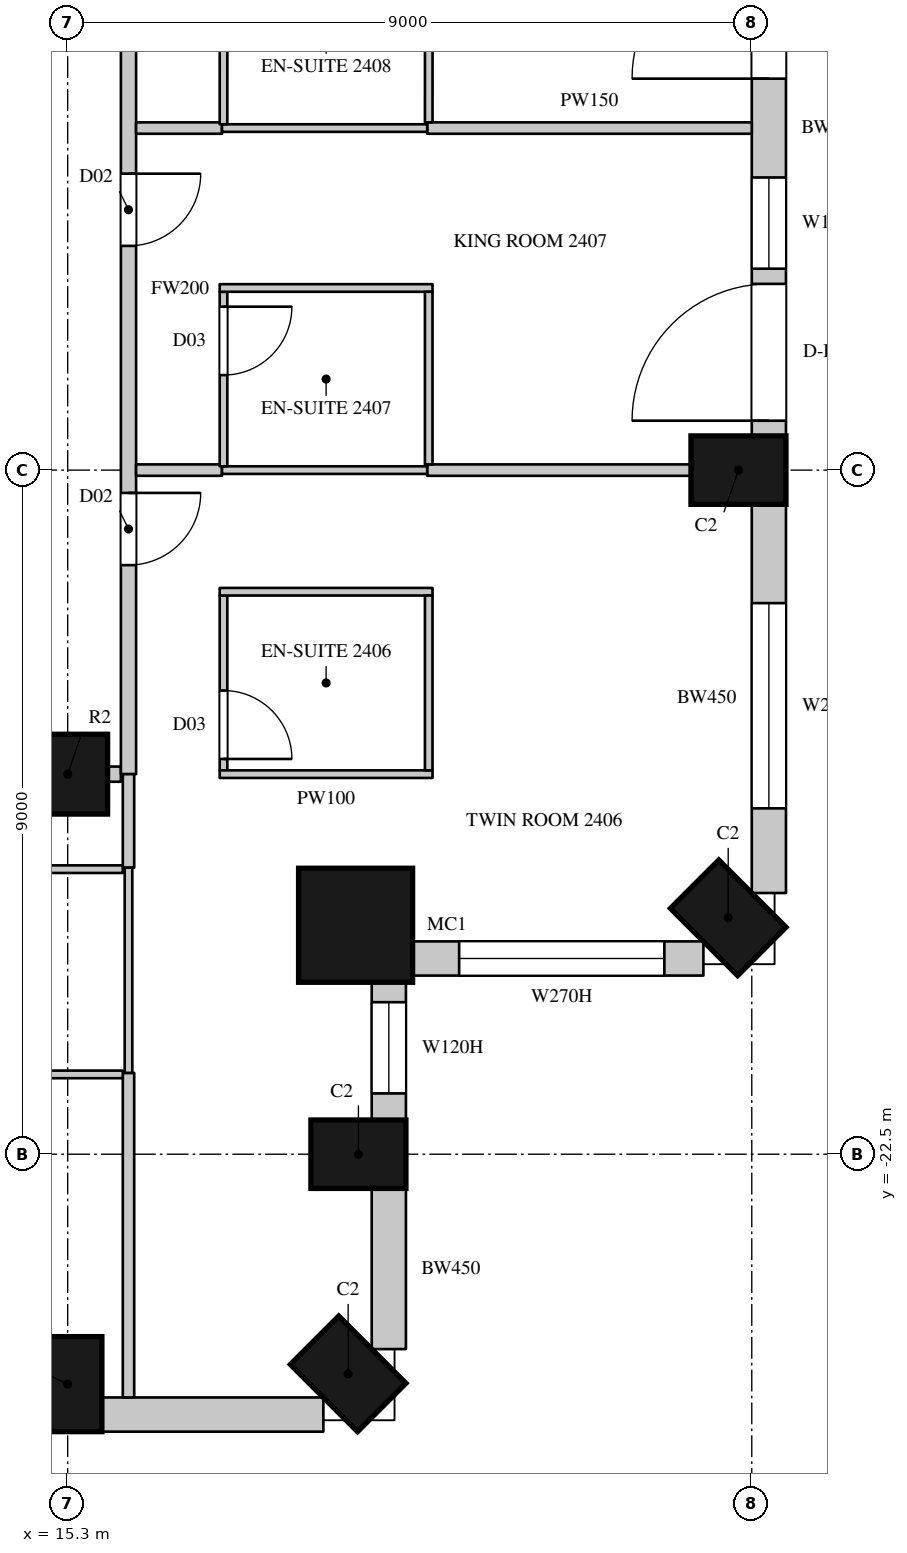
"""IFC4 building model, lengths in metres.
Left out: names, types, materials, properties, quantities, classifications, styles, units other than length and angle.
Written with IfcOpenShell. Run it as: python <this file> out.ifc"""

import sys

from ifc_helpers import new_model, si_unit, direction, frame, frame_2d, origin, origin_2d, place, context, subcontext, project, spatial, rectangle, circle, extrude, element, fill, save


model = new_model("IFC4")
c1 = context("Model", 3, precision=1e-05, world=origin(), true_north=direction((0.0, 1.0)))
c2 = subcontext(c1, "Body", "Model", "MODEL_VIEW")
j1 = project(units=[si_unit("LENGTHUNIT", "METRE"), si_unit("PLANEANGLEUNIT", "RADIAN")], contexts=[c1])
p1 = place(None, origin())
s1 = spatial("IfcSite", under=j1, at=p1, CompositionType="ELEMENT")
p2 = place(p1, origin())
s2 = spatial("IfcBuilding", under=s1, at=p2, CompositionType="ELEMENT")
p3 = place(p2, frame((0.0, 0.0, 116.7)))
s3 = spatial("IfcBuildingStorey", under=s2, at=p3, CompositionType="ELEMENT", Elevation=116.7)
for number, where, z_axis, x_axis in (
    (1, (15.3, -25.525, 0.0), (0.0, 0.0, 1.0), (1.0, 0.0, 0.0)),
    (2, (18.99, -25.39, 0.0), (0.0, 0.0, 1.0), (0.707, 0.707, 0.0)),
    (3, (19.125, -22.5, 0.0), (0.0, 0.0, 1.0), (0.0, 1.0, 0.0)),
):
    element("IfcColumn", number, at=place(p3, frame(where, z_axis=z_axis, x_axis=x_axis)), inside=s3, PredefinedType="COLUMN", context=c2, shape_type="SweptSolid", body=[
        extrude(rectangle(XDim=0.9, YDim=1.25, at=origin_2d()), origin(), (0.0, 0.0, 1.0), 3.6),
    ])
p4 = place(p3, frame((19.088, -19.488, 0.0), z_axis=(0.0, 0.0, 1.0), x_axis=(1.0, 0.0, 0.0)))
e4 = element("IfcColumn", 4, at=p4, inside=s3, PredefinedType="COLUMN", context=c2, shape_type="SweptSolid", body=[
    extrude(circle(Radius=0.75, at=origin_2d()), origin(), (0.0, 0.0, 1.0), 3.6),
])
for number, where, z_axis, x_axis in (
    (5, (23.99, -19.39, 0.0), (0.0, 0.0, 1.0), (0.707, 0.707, 0.0)),
    (6, (24.125, -13.5, 0.0), (0.0, 0.0, 1.0), (0.0, 1.0, 0.0)),
):
    element("IfcColumn", number, at=place(p3, frame(where, z_axis=z_axis, x_axis=x_axis)), inside=s3, PredefinedType="COLUMN", context=c2, shape_type="SweptSolid", body=[
        extrude(rectangle(XDim=0.9, YDim=1.25, at=origin_2d()), origin(), (0.0, 0.0, 1.0), 3.6),
    ])
p5 = place(p3, frame((15.3, -17.5, 0.0), z_axis=(0.0, 0.0, 1.0), x_axis=(1.0, 0.0, 0.0)))
e7 = element("IfcColumn", 7, at=p5, inside=s3, PredefinedType="COLUMN", context=c2, shape_type="SweptSolid", body=[
    extrude(circle(Radius=0.525, at=origin_2d()), origin(), (0.0, 0.0, 1.0), 3.6),
])
p6 = place(p3, frame((15.75, -25.925, 0.0), z_axis=(0.0, 0.0, 1.0), x_axis=(1.0, 0.0, 0.0)))
e8 = element("IfcWall", 8, at=p6, inside=s3, PredefinedType="SOLIDWALL", context=c2, shape_type="SweptSolid", body=[
    extrude(rectangle(XDim=2.914, YDim=0.45, at=frame_2d((1.457, 0.0))), origin(), (0.0, 0.0, 1.0), 3.3),
])
p7 = place(p3, frame((19.525, -25.064, 0.0), z_axis=(0.0, 0.0, 1.0), x_axis=(0.0, 1.0, 0.0)))
e9 = element("IfcWall", 9, at=p7, inside=s3, PredefinedType="SOLIDWALL", context=c2, shape_type="SweptSolid", body=[
    extrude(rectangle(XDim=2.114, YDim=0.45, at=frame_2d((1.057, 0.0))), origin(), (0.0, 0.0, 1.0), 3.3),
])
p8 = place(p3, frame((19.525, -22.05, 0.0), z_axis=(0.0, 0.0, 1.0), x_axis=(0.0, 1.0, 0.0)))
e10 = element("IfcWall", 10, at=p8, inside=s3, PredefinedType="SOLIDWALL", context=c2, shape_type="SweptSolid", body=[
    extrude(rectangle(XDim=1.843, YDim=0.45, at=frame_2d((0.921, 0.0))), origin(), (0.0, 0.0, 1.0), 3.3),
])
p9 = place(p8, frame((0.35, 0.0, 1.05)))
e11 = element("IfcOpeningElement", 11, at=p9, cuts=e10, PredefinedType="OPENING", context=c2, shape_type="SweptSolid", body=[
    extrude(rectangle(XDim=1.2, YDim=2.0, at=frame_2d((0.6, 1.0))), frame((0.0, 0.235, 0.0), z_axis=(0.0, -1.0, 0.0), x_axis=(1.0, 0.0, 0.0)), (0.0, 0.0, 1.0), 0.47),
])
p10 = place(p3, frame((19.807, -19.925, 0.0), z_axis=(0.0, 0.0, 1.0), x_axis=(1.0, 0.0, 0.0)))
e12 = element("IfcWall", 12, at=p10, inside=s3, PredefinedType="SOLIDWALL", context=c2, shape_type="SweptSolid", body=[
    extrude(rectangle(XDim=3.857, YDim=0.45, at=frame_2d((1.928, 0.0))), origin(), (0.0, 0.0, 1.0), 3.3),
])
p11 = place(p10, frame((0.643, 0.0, 1.05)))
e13 = element("IfcOpeningElement", 13, at=p11, cuts=e12, PredefinedType="OPENING", context=c2, shape_type="SweptSolid", body=[
    extrude(rectangle(XDim=2.7, YDim=2.0, at=frame_2d((1.35, 1.0))), frame((0.0, 0.235, 0.0), z_axis=(0.0, -1.0, 0.0), x_axis=(1.0, 0.0, 0.0)), (0.0, 0.0, 1.0), 0.47),
])
p12 = place(p3, frame((24.525, -19.064, 0.0), z_axis=(0.0, 0.0, 1.0), x_axis=(0.0, 1.0, 0.0)))
e14 = element("IfcWall", 14, at=p12, inside=s3, PredefinedType="SOLIDWALL", context=c2, shape_type="SweptSolid", body=[
    extrude(rectangle(XDim=5.114, YDim=0.45, at=frame_2d((2.557, 0.0))), origin(), (0.0, 0.0, 1.0), 3.3),
])
p13 = place(p12, frame((1.114, 0.0, 1.05)))
e15 = element("IfcOpeningElement", 15, at=p13, cuts=e14, PredefinedType="OPENING", context=c2, shape_type="SweptSolid", body=[
    extrude(rectangle(XDim=2.7, YDim=2.0, at=frame_2d((1.35, 1.0))), frame((0.0, 0.235, 0.0), z_axis=(0.0, -1.0, 0.0), x_axis=(1.0, 0.0, 0.0)), (0.0, 0.0, 1.0), 0.47),
])
p14 = place(p3, frame((24.525, -13.05, 0.0), z_axis=(0.0, 0.0, 1.0), x_axis=(0.0, 1.0, 0.0)))
e16 = element("IfcWall", 16, at=p14, inside=s3, PredefinedType="SOLIDWALL", context=c2, shape_type="SweptSolid", body=[
    extrude(rectangle(XDim=8.1, YDim=0.45, at=frame_2d((4.05, 0.0))), origin(), (0.0, 0.0, 1.0), 3.3),
])
p15 = place(p14, frame((0.2, 0.0, 0.0)))
e17 = element("IfcOpeningElement", 17, at=p15, cuts=e16, PredefinedType="OPENING", context=c2, shape_type="SweptSolid", body=[
    extrude(rectangle(XDim=1.8, YDim=2.4, at=frame_2d((0.9, 1.2))), frame((0.0, 0.235, 0.0), z_axis=(0.0, -1.0, 0.0), x_axis=(1.0, 0.0, 0.0)), (0.0, 0.0, 1.0), 0.47),
])
p16 = place(p14, frame((2.2, 0.0, 1.05)))
e18 = element("IfcOpeningElement", 18, at=p16, cuts=e16, PredefinedType="OPENING", context=c2, shape_type="SweptSolid", body=[
    extrude(rectangle(XDim=1.2, YDim=2.0, at=frame_2d((0.6, 1.0))), frame((0.0, 0.235, 0.0), z_axis=(0.0, -1.0, 0.0), x_axis=(1.0, 0.0, 0.0)), (0.0, 0.0, 1.0), 0.47),
])
p17 = place(p14, frame((4.7, 0.0, 0.0)))
e19 = element("IfcOpeningElement", 19, at=p17, cuts=e16, PredefinedType="OPENING", context=c2, shape_type="SweptSolid", body=[
    extrude(rectangle(XDim=1.8, YDim=2.4, at=frame_2d((0.9, 1.2))), frame((0.0, 0.235, 0.0), z_axis=(0.0, -1.0, 0.0), x_axis=(1.0, 0.0, 0.0)), (0.0, 0.0, 1.0), 0.47),
])
p18 = place(p14, frame((6.7, 0.0, 1.05)))
e20 = element("IfcOpeningElement", 20, at=p18, cuts=e16, PredefinedType="OPENING", context=c2, shape_type="SweptSolid", body=[
    extrude(rectangle(XDim=1.2, YDim=2.0, at=frame_2d((0.6, 1.0))), frame((0.0, 0.235, 0.0), z_axis=(0.0, -1.0, 0.0), x_axis=(1.0, 0.0, 0.0)), (0.0, 0.0, 1.0), 0.47),
])
p19 = place(p3, frame((15.825, -17.5, 0.0), z_axis=(0.0, 0.0, 1.0), x_axis=(1.0, 0.0, 0.0)))
e21 = element("IfcWall", 21, at=p19, inside=s3, PredefinedType="PARTITIONING", context=c2, shape_type="SweptSolid", body=[
    extrude(rectangle(XDim=0.175, YDim=0.2, at=frame_2d((0.087, 0.0))), origin(), (0.0, 0.0, 1.0), 3.3),
])
p20 = place(p3, frame((16.1, -17.5, 0.0), z_axis=(0.0, 0.0, 1.0), x_axis=(0.0, 1.0, 0.0)))
e22 = element("IfcWall", 22, at=p20, inside=s3, PredefinedType="PARTITIONING", context=c2, shape_type="SweptSolid", body=[
    extrude(rectangle(XDim=12.75, YDim=0.2, at=frame_2d((6.375, 0.0))), origin(), (0.0, 0.0, 1.0), 3.3),
])
p21 = place(p20, frame((2.75, 0.0, 0.0)))
e23 = element("IfcOpeningElement", 23, at=p21, cuts=e22, PredefinedType="OPENING", context=c2, shape_type="SweptSolid", body=[
    extrude(rectangle(XDim=0.95, YDim=2.2, at=frame_2d((0.475, 1.1))), frame((0.0, 0.11, 0.0), z_axis=(0.0, -1.0, 0.0), x_axis=(1.0, 0.0, 0.0)), (0.0, 0.0, 1.0), 0.22),
])
p22 = place(p20, frame((6.95, 0.0, 0.0)))
e24 = element("IfcOpeningElement", 24, at=p22, cuts=e22, PredefinedType="OPENING", context=c2, shape_type="SweptSolid", body=[
    extrude(rectangle(XDim=0.95, YDim=2.2, at=frame_2d((0.475, 1.1))), frame((0.0, 0.11, 0.0), z_axis=(0.0, -1.0, 0.0), x_axis=(1.0, 0.0, 0.0)), (0.0, 0.0, 1.0), 0.22),
])
p23 = place(p20, frame((11.4, 0.0, 0.0)))
e25 = element("IfcOpeningElement", 25, at=p23, cuts=e22, PredefinedType="OPENING", context=c2, shape_type="SweptSolid", body=[
    extrude(rectangle(XDim=0.95, YDim=2.2, at=frame_2d((0.475, 1.1))), frame((0.0, 0.11, 0.0), z_axis=(0.0, -1.0, 0.0), x_axis=(1.0, 0.0, 0.0)), (0.0, 0.0, 1.0), 0.22),
])
p24 = place(p3, frame((16.1, -25.7, 0.0), z_axis=(0.0, 0.0, 1.0), x_axis=(0.0, 1.0, 0.0)))
e26 = element("IfcWall", 26, at=p24, inside=s3, PredefinedType="PARTITIONING", context=c2, shape_type="SweptSolid", body=[
    extrude(rectangle(XDim=4.27, YDim=0.15, at=frame_2d((2.135, 0.0))), origin(), (0.0, 0.0, 1.0), 3.3),
])
p25 = place(p3, frame((16.1, -18.73, 0.0), z_axis=(0.0, 0.0, 1.0), x_axis=(0.0, 1.0, 0.0)))
e27 = element("IfcWall", 27, at=p25, inside=s3, PredefinedType="PARTITIONING", context=c2, shape_type="SweptSolid", body=[
    extrude(rectangle(XDim=1.23, YDim=0.15, at=frame_2d((0.615, 0.0))), origin(), (0.0, 0.0, 1.0), 3.3),
])
p26 = place(p3, frame((16.2, -13.5, 0.0), z_axis=(0.0, 0.0, 1.0), x_axis=(1.0, 0.0, 0.0)))
e28 = element("IfcWall", 28, at=p26, inside=s3, PredefinedType="PARTITIONING", context=c2, shape_type="SweptSolid", body=[
    extrude(rectangle(XDim=1.13, YDim=0.15, at=frame_2d((0.565, 0.0))), origin(), (0.0, 0.0, 1.0), 3.3),
])
p27 = place(p3, frame((16.2, -9.0, 0.0), z_axis=(0.0, 0.0, 1.0), x_axis=(1.0, 0.0, 0.0)))
e29 = element("IfcWall", 29, at=p27, inside=s3, PredefinedType="PARTITIONING", context=c2, shape_type="SweptSolid", body=[
    extrude(rectangle(XDim=1.13, YDim=0.15, at=frame_2d((0.565, 0.0))), origin(), (0.0, 0.0, 1.0), 2.65),
])
p28 = place(p3, frame((20.03, -13.5, 0.0), z_axis=(0.0, 0.0, 1.0), x_axis=(1.0, 0.0, 0.0)))
e30 = element("IfcWall", 30, at=p28, inside=s3, PredefinedType="PARTITIONING", context=c2, shape_type="SweptSolid", body=[
    extrude(rectangle(XDim=3.47, YDim=0.15, at=frame_2d((1.735, 0.0))), origin(), (0.0, 0.0, 1.0), 3.3),
])
p29 = place(p3, frame((20.03, -9.0, 0.0), z_axis=(0.0, 0.0, 1.0), x_axis=(1.0, 0.0, 0.0)))
e31 = element("IfcWall", 31, at=p29, inside=s3, PredefinedType="PARTITIONING", context=c2, shape_type="SweptSolid", body=[
    extrude(rectangle(XDim=4.27, YDim=0.15, at=frame_2d((2.135, 0.0))), origin(), (0.0, 0.0, 1.0), 2.65),
])
for number, where, z_axis, x_axis in (
    (32, (13.65, -21.45, 0.0), (0.0, 0.0, 1.0), (1.0, 0.0, 0.0)),
    (33, (13.65, -18.75, 0.0), (0.0, 0.0, 1.0), (1.0, 0.0, 0.0)),
):
    element("IfcWall", number, at=place(p3, frame(where, z_axis=z_axis, x_axis=x_axis)), inside=s3, PredefinedType="PARTITIONING", context=c2, shape_type="SweptSolid", body=[
        extrude(rectangle(XDim=2.375, YDim=0.1, at=frame_2d((1.188, 0.0))), origin(), (0.0, 0.0, 1.0), 3.3),
    ])
for number, where, z_axis, x_axis in (
    (34, (16.1, -21.43, 0.0), (0.0, 0.0, 1.0), (0.0, 1.0, 0.0)),
    (35, (17.33, -13.5, 0.0), (0.0, 0.0, 1.0), (1.0, 0.0, 0.0)),
):
    element("IfcWall", number, at=place(p3, frame(where, z_axis=z_axis, x_axis=x_axis)), inside=s3, PredefinedType="PARTITIONING", context=c2, shape_type="SweptSolid", body=[
        extrude(rectangle(XDim=2.7, YDim=0.1, at=frame_2d((1.35, 0.0))), origin(), (0.0, 0.0, 1.0), 3.3),
    ])
p30 = place(p3, frame((17.33, -9.0, 0.0), z_axis=(0.0, 0.0, 1.0), x_axis=(1.0, 0.0, 0.0)))
e36 = element("IfcWall", 36, at=p30, inside=s3, PredefinedType="PARTITIONING", context=c2, shape_type="SweptSolid", body=[
    extrude(rectangle(XDim=2.7, YDim=0.1, at=frame_2d((1.35, 0.0))), origin(), (0.0, 0.0, 1.0), 2.65),
])
p31 = place(p3, frame((17.35, -17.45, 0.0), z_axis=(0.0, 0.0, 1.0), x_axis=(0.0, 1.0, 0.0)))
e37 = element("IfcWall", 37, at=p31, inside=s3, PredefinedType="PARTITIONING", context=c2, shape_type="SweptSolid", body=[
    extrude(rectangle(XDim=2.3, YDim=0.1, at=frame_2d((1.15, 0.0))), origin(), (0.0, 0.0, 1.0), 3.3),
])
p32 = place(p31, frame((0.15, 0.0, 0.0)))
e38 = element("IfcOpeningElement", 38, at=p32, cuts=e37, PredefinedType="OPENING", context=c2, shape_type="SweptSolid", body=[
    extrude(rectangle(XDim=0.9, YDim=2.2, at=frame_2d((0.45, 1.1))), frame((0.0, 0.06, 0.0), z_axis=(0.0, -1.0, 0.0), x_axis=(1.0, 0.0, 0.0)), (0.0, 0.0, 1.0), 0.12),
])
for number, where, z_axis, x_axis in (
    (39, (17.3, -17.5, 0.0), (0.0, 0.0, 1.0), (1.0, 0.0, 0.0)),
    (40, (17.3, -15.1, 0.0), (0.0, 0.0, 1.0), (1.0, 0.0, 0.0)),
):
    element("IfcWall", number, at=place(p3, frame(where, z_axis=z_axis, x_axis=x_axis)), inside=s3, PredefinedType="PARTITIONING", context=c2, shape_type="SweptSolid", body=[
        extrude(rectangle(XDim=2.8, YDim=0.1, at=frame_2d((1.4, 0.0))), origin(), (0.0, 0.0, 1.0), 3.3),
    ])
p33 = place(p3, frame((17.35, -13.45, 0.0), z_axis=(0.0, 0.0, 1.0), x_axis=(0.0, 1.0, 0.0)))
e41 = element("IfcWall", 41, at=p33, inside=s3, PredefinedType="PARTITIONING", context=c2, shape_type="SweptSolid", body=[
    extrude(rectangle(XDim=2.296, YDim=0.1, at=frame_2d((1.148, 0.0))), origin(), (0.0, 0.0, 1.0), 3.3),
])
p34 = place(p33, frame((1.2, 0.0, 0.0)))
e42 = element("IfcOpeningElement", 42, at=p34, cuts=e41, PredefinedType="OPENING", context=c2, shape_type="SweptSolid", body=[
    extrude(rectangle(XDim=0.9, YDim=2.2, at=frame_2d((0.45, 1.1))), frame((0.0, 0.06, 0.0), z_axis=(0.0, -1.0, 0.0), x_axis=(1.0, 0.0, 0.0)), (0.0, 0.0, 1.0), 0.12),
])
p35 = place(p3, frame((17.3, -11.104, 0.0), z_axis=(0.0, 0.0, 1.0), x_axis=(1.0, 0.0, 0.0)))
e43 = element("IfcWall", 43, at=p35, inside=s3, PredefinedType="PARTITIONING", context=c2, shape_type="SweptSolid", body=[
    extrude(rectangle(XDim=2.8, YDim=0.1, at=frame_2d((1.4, 0.0))), origin(), (0.0, 0.0, 1.0), 3.3),
])
p36 = place(p3, frame((17.35, -8.95, 0.0), z_axis=(0.0, 0.0, 1.0), x_axis=(0.000407580973, 0.999999916939, 0.0)))
e44 = element("IfcWall", 44, at=p36, inside=s3, PredefinedType="PARTITIONING", context=c2, shape_type="SweptSolid", body=[
    extrude(rectangle(XDim=2.396, YDim=0.1, at=frame_2d((1.198, 0.0))), origin(), (0.0, 0.0, 1.0), 3.3),
])
p37 = place(p36, frame((1.25, 0.0, 0.0)))
e45 = element("IfcOpeningElement", 45, at=p37, cuts=e44, PredefinedType="OPENING", context=c2, shape_type="SweptSolid", body=[
    extrude(rectangle(XDim=0.9, YDim=2.2, at=frame_2d((0.45, 1.1))), frame((0.0, 0.06, 0.0), z_axis=(0.0, -1.0, 0.0), x_axis=(1.0, 0.0, 0.0)), (0.0, 0.0, 1.0), 0.12),
])
p38 = place(p3, frame((20.05, -17.45, 0.0), z_axis=(0.0, 0.0, 1.0), x_axis=(0.0, 1.0, 0.0)))
e46 = element("IfcWall", 46, at=p38, inside=s3, PredefinedType="PARTITIONING", context=c2, shape_type="SweptSolid", body=[
    extrude(rectangle(XDim=2.3, YDim=0.1, at=frame_2d((1.15, 0.0))), origin(), (0.0, 0.0, 1.0), 3.3),
])
p39 = place(p3, frame((20.05, -13.425, 0.0), z_axis=(0.0, 0.0, 1.0), x_axis=(0.0, 1.0, 0.0)))
e47 = element("IfcWall", 47, at=p39, inside=s3, PredefinedType="PARTITIONING", context=c2, shape_type="SweptSolid", body=[
    extrude(rectangle(XDim=2.271, YDim=0.1, at=frame_2d((1.135, 0.0))), origin(), (0.0, 0.0, 1.0), 3.3),
])
p40 = place(p3, frame((20.05, -8.925, 0.0), z_axis=(0.0, 0.0, 1.0), x_axis=(0.000430200003, 0.999999907464, 0.0)))
e48 = element("IfcWall", 48, at=p40, inside=s3, PredefinedType="PARTITIONING", context=c2, shape_type="SweptSolid", body=[
    extrude(rectangle(XDim=2.27, YDim=0.1, at=frame_2d((1.135, 0.0))), origin(), (0.0, 0.0, 1.0), 3.3),
])
p41 = place(p9, origin())
e49 = element("IfcWindow", 49, at=p41, inside=s3, PartitioningType="SINGLE_PANEL", PredefinedType="WINDOW", context=c2, shape_type="SweptSolid", body=[
    extrude(rectangle(XDim=1.2, YDim=2.0, at=frame_2d((0.6, 1.0))), frame((0.0, 0.135, 0.0), z_axis=(0.0, -1.0, 0.0), x_axis=(1.0, 0.0, 0.0)), (0.0, 0.0, 1.0), 0.06),
])
fill(e11, e49)
p42 = place(p11, origin())
e50 = element("IfcWindow", 50, at=p42, inside=s3, PartitioningType="SINGLE_PANEL", PredefinedType="WINDOW", context=c2, shape_type="SweptSolid", body=[
    extrude(rectangle(XDim=2.7, YDim=2.0, at=frame_2d((1.35, 1.0))), frame((0.0, 0.135, 0.0), z_axis=(0.0, -1.0, 0.0), x_axis=(1.0, 0.0, 0.0)), (0.0, 0.0, 1.0), 0.06),
])
fill(e13, e50)
p43 = place(p13, origin())
e51 = element("IfcWindow", 51, at=p43, inside=s3, PartitioningType="SINGLE_PANEL", PredefinedType="WINDOW", context=c2, shape_type="SweptSolid", body=[
    extrude(rectangle(XDim=2.7, YDim=2.0, at=frame_2d((1.35, 1.0))), frame((0.0, 0.135, 0.0), z_axis=(0.0, -1.0, 0.0), x_axis=(1.0, 0.0, 0.0)), (0.0, 0.0, 1.0), 0.06),
])
fill(e15, e51)
p44 = place(p15, origin())
e52 = element("IfcDoor", 52, at=p44, inside=s3, OperationType="SLIDING_TO_LEFT", PredefinedType="DOOR", context=c2, shape_type="SweptSolid", body=[
    extrude(rectangle(XDim=1.8, YDim=2.4, at=frame_2d((0.9, 1.2))), frame((0.0, 0.13, 0.0), z_axis=(0.0, -1.0, 0.0), x_axis=(1.0, 0.0, 0.0)), (0.0, 0.0, 1.0), 0.05),
])
fill(e17, e52)
p45 = place(p16, origin())
e53 = element("IfcWindow", 53, at=p45, inside=s3, PartitioningType="SINGLE_PANEL", PredefinedType="WINDOW", context=c2, shape_type="SweptSolid", body=[
    extrude(rectangle(XDim=1.2, YDim=2.0, at=frame_2d((0.6, 1.0))), frame((0.0, 0.135, 0.0), z_axis=(0.0, -1.0, 0.0), x_axis=(1.0, 0.0, 0.0)), (0.0, 0.0, 1.0), 0.06),
])
fill(e18, e53)
p46 = place(p17, origin())
e54 = element("IfcDoor", 54, at=p46, inside=s3, OperationType="SLIDING_TO_LEFT", PredefinedType="DOOR", context=c2, shape_type="SweptSolid", body=[
    extrude(rectangle(XDim=1.8, YDim=2.4, at=frame_2d((0.9, 1.2))), frame((0.0, 0.13, 0.0), z_axis=(0.0, -1.0, 0.0), x_axis=(1.0, 0.0, 0.0)), (0.0, 0.0, 1.0), 0.05),
])
fill(e19, e54)
p47 = place(p21, origin())
e55 = element("IfcDoor", 55, at=p47, inside=s3, OperationType="SINGLE_SWING_LEFT", PredefinedType="DOOR", context=c2, shape_type="SweptSolid", body=[
    extrude(rectangle(XDim=0.95, YDim=2.2, at=frame_2d((0.475, 1.1))), frame((0.0, 0.025, 0.0), z_axis=(0.0, -1.0, 0.0), x_axis=(1.0, 0.0, 0.0)), (0.0, 0.0, 1.0), 0.05),
])
fill(e23, e55)
p48 = place(p32, origin())
e56 = element("IfcDoor", 56, at=p48, inside=s3, OperationType="SINGLE_SWING_RIGHT", PredefinedType="DOOR", context=c2, shape_type="SweptSolid", body=[
    extrude(rectangle(XDim=0.9, YDim=2.2, at=frame_2d((0.45, 1.1))), frame((0.0, 0.025, 0.0), z_axis=(0.0, -1.0, 0.0), x_axis=(1.0, 0.0, 0.0)), (0.0, 0.0, 1.0), 0.05),
])
fill(e38, e56)
p49 = place(p22, origin())
e57 = element("IfcDoor", 57, at=p49, inside=s3, OperationType="SINGLE_SWING_LEFT", PredefinedType="DOOR", context=c2, shape_type="SweptSolid", body=[
    extrude(rectangle(XDim=0.95, YDim=2.2, at=frame_2d((0.475, 1.1))), frame((0.0, 0.025, 0.0), z_axis=(0.0, -1.0, 0.0), x_axis=(1.0, 0.0, 0.0)), (0.0, 0.0, 1.0), 0.05),
])
fill(e24, e57)
p50 = place(p34, origin())
e58 = element("IfcDoor", 58, at=p50, inside=s3, OperationType="SINGLE_SWING_LEFT", PredefinedType="DOOR", context=c2, shape_type="SweptSolid", body=[
    extrude(rectangle(XDim=0.9, YDim=2.2, at=frame_2d((0.45, 1.1))), frame((0.0, 0.025, 0.0), z_axis=(0.0, -1.0, 0.0), x_axis=(1.0, 0.0, 0.0)), (0.0, 0.0, 1.0), 0.05),
])
fill(e42, e58)
save(model, sys.argv[1])
